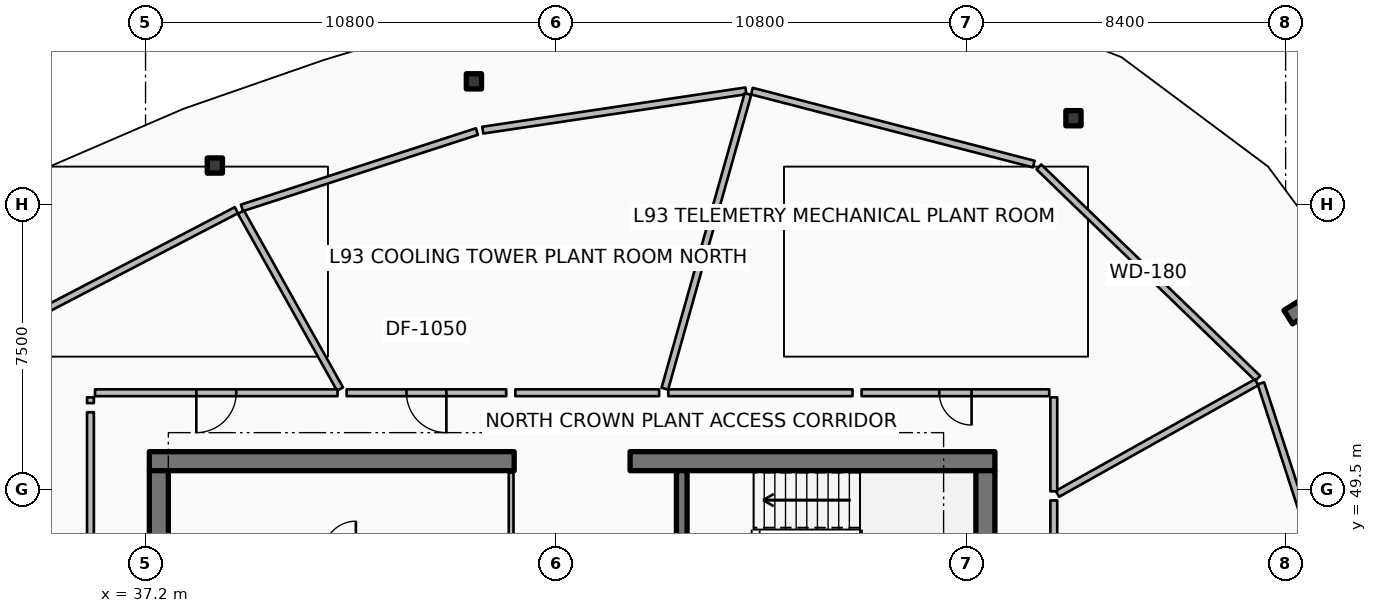
"""IFC4 building model, lengths in metres.
Left out: names, types, materials, properties, quantities, classifications, styles, units other than length and angle.
Written with IfcOpenShell. Run it as: python <this file> out.ifc"""

import sys

from ifc_helpers import new_model, si_unit, direction, frame, frame_2d, origin, origin_2d, place, context, subcontext, project, spatial, rectangle, hollow_rectangle, extrude, element, fill, save


model = new_model("IFC4")
c1 = context("Model", 3, precision=1e-05, world=origin(), true_north=direction((0.0, 1.0)))
c2 = subcontext(c1, "Body", "Model", "MODEL_VIEW")
j1 = project(units=[si_unit("LENGTHUNIT", "METRE"), si_unit("PLANEANGLEUNIT", "RADIAN")], contexts=[c1])
p1 = place(None, origin())
s1 = spatial("IfcSite", under=j1, at=p1, CompositionType="ELEMENT")
p2 = place(p1, origin())
s2 = spatial("IfcBuilding", under=s1, at=p2, CompositionType="ELEMENT")
p3 = place(p2, frame((0.0, 0.0, 370.4)))
s3 = spatial("IfcBuildingStorey", under=s2, at=p3, CompositionType="ELEMENT", Elevation=370.4)
p4 = place(p3, frame((37.3, 50.25, 0.0), z_axis=(0.0, 0.0, 1.0), x_axis=(1.0, 0.0, 0.0)))
e1 = element("IfcWall", 1, at=p4, inside=s3, PredefinedType="SHEAR", context=c2, shape_type="SweptSolid", body=[
    extrude(rectangle(XDim=9.6, YDim=0.5, at=frame_2d((4.8, 0.0))), origin(), (0.0, 0.0, 1.0), 3.6),
])
p5 = place(p3, frame((49.95, 50.25, 0.0), z_axis=(0.0, 0.0, 1.0), x_axis=(1.0, 0.0, 0.0)))
e2 = element("IfcWall", 2, at=p5, inside=s3, PredefinedType="SHEAR", context=c2, shape_type="SweptSolid", body=[
    extrude(rectangle(XDim=9.6, YDim=0.5, at=frame_2d((4.8, 0.0))), origin(), (0.0, 0.0, 1.0), 3.6),
])
for number, where, z_axis, x_axis in (
    (3, (37.55, 34.0, 0.0), (0.0, 0.0, 1.0), (0.0, 1.0, 0.0)),
    (4, (59.3, 34.0, 0.0), (0.0, 0.0, 1.0), (0.0, 1.0, 0.0)),
):
    element("IfcWall", number, at=place(p3, frame(where, z_axis=z_axis, x_axis=x_axis)), inside=s3, PredefinedType="SHEAR", context=c2, shape_type="SweptSolid", body=[
        extrude(rectangle(XDim=16.0, YDim=0.5, at=frame_2d((8.0, 0.0))), origin(), (0.0, 0.0, 1.0), 3.6),
    ])
p6 = place(p3, frame((51.31, 46.5, 0.0), z_axis=(0.0, 0.0, 1.0), x_axis=(0.0, 1.0, 0.0)))
e5 = element("IfcWall", 5, at=p6, inside=s3, PredefinedType="SHEAR", context=c2, shape_type="SweptSolid", body=[
    extrude(rectangle(XDim=3.5, YDim=0.28, at=frame_2d((1.75, 0.0))), origin(), (0.0, 0.0, 1.0), 3.6),
])
p7 = place(p3, frame((67.269, 54.041, 0.0), z_axis=(0.0, 0.0, 1.0), x_axis=(0.848033572426, 0.529942506352, 0.0)))
e6 = element("IfcWall", 6, at=p7, inside=s3, PredefinedType="SOLIDWALL", context=c2, shape_type="SweptSolid", body=[
    extrude(rectangle(XDim=3.5, YDim=0.42, at=frame_2d((1.75, 0.0))), origin(), (0.0, 0.0, 1.0), 3.6),
])
for number, where, z_axis, x_axis in (
    (7, (61.617, 59.274, 0.0), (0.0, 0.0, 1.0), (1.0, 0.0, 0.0)),
    (8, (45.841, 60.244, 0.0), (0.0, 0.0, 1.0), (1.0, 0.0, 0.0)),
    (9, (39.023, 58.029, 0.0), (0.0, 0.0, 1.0), (1.0, 0.0, 0.0)),
):
    element("IfcColumn", number, at=place(p3, frame(where, z_axis=z_axis, x_axis=x_axis)), inside=s3, PredefinedType="COLUMN", context=c2, shape_type="SweptSolid", body=[
        extrude(hollow_rectangle(XDim=0.4, YDim=0.4, WallThickness=0.02, InnerFilletRadius=0.02, OuterFilletRadius=0.04, at=origin_2d()), origin(), (0.0, 0.0, 1.0), 3.32),
    ])
p8 = place(p3, frame((46.82, 47.92, 0.0), z_axis=(0.0, 0.0, 1.0), x_axis=(0.0, 1.0, 0.0)))
e10 = element("IfcWall", 10, at=p8, inside=s3, PredefinedType="PARTITIONING", context=c2, shape_type="SweptSolid", body=[
    extrude(rectangle(XDim=2.03, YDim=0.125, at=frame_2d((1.015, 0.0))), origin(), (0.0, 0.0, 1.0), 2.76),
])
p9 = place(p3, frame((66.467, 52.43, 0.0), z_axis=(0.0, 0.0, 1.0), x_axis=(-0.719364153135, 0.694633151516, 0.0)))
e11 = element("IfcWall", 11, at=p9, inside=s3, PredefinedType="PARTITIONING", context=c2, shape_type="SweptSolid", body=[
    extrude(rectangle(XDim=8.006, YDim=0.18, at=frame_2d((4.003, 0.0))), origin(), (0.0, 0.0, 1.0), 2.76),
])
p10 = place(p3, frame((60.573, 58.066, 0.0), z_axis=(0.0, 0.0, 1.0), x_axis=(-0.968117205342, 0.250497658115, 0.0)))
e12 = element("IfcWall", 12, at=p10, inside=s3, PredefinedType="PARTITIONING", context=c2, shape_type="SweptSolid", body=[
    extrude(rectangle(XDim=7.662, YDim=0.18, at=frame_2d((3.831, 0.0))), origin(), (0.0, 0.0, 1.0), 2.76),
])
p11 = place(p3, frame((52.999, 59.994, 0.0), z_axis=(0.0, 0.0, 1.0), x_axis=(-0.989034336252, -0.147685753256, 0.0)))
e13 = element("IfcWall", 13, at=p11, inside=s3, PredefinedType="PARTITIONING", context=c2, shape_type="SweptSolid", body=[
    extrude(rectangle(XDim=7.003, YDim=0.18, at=frame_2d((3.501, 0.0))), origin(), (0.0, 0.0, 1.0), 2.76),
])
p12 = place(p3, frame((45.918, 58.923, 0.0), z_axis=(0.0, 0.0, 1.0), x_axis=(-0.95105283999, -0.309028308649, 0.0)))
e14 = element("IfcWall", 14, at=p12, inside=s3, PredefinedType="PARTITIONING", context=c2, shape_type="SweptSolid", body=[
    extrude(rectangle(XDim=6.499, YDim=0.18, at=frame_2d((3.25, 0.0))), origin(), (0.0, 0.0, 1.0), 2.76),
])
p13 = place(p3, frame((39.59, 56.853, 0.0), z_axis=(0.0, 0.0, 1.0), x_axis=(-0.886949494865, -0.461866423935, 0.0)))
e15 = element("IfcWall", 15, at=p13, inside=s3, PredefinedType="PARTITIONING", context=c2, shape_type="SweptSolid", body=[
    extrude(rectangle(XDim=7.002, YDim=0.18, at=frame_2d((3.501, 0.0))), origin(), (0.0, 0.0, 1.0), 2.76),
])
p14 = place(p3, frame((69.059, 44.572, 0.0), z_axis=(0.0, 0.0, 1.0), x_axis=(-0.309024234991, 0.951054163646, 0.0)))
e16 = element("IfcWall", 16, at=p14, inside=s3, PredefinedType="PARTITIONING", context=c2, shape_type="SweptSolid", body=[
    extrude(rectangle(XDim=8.124, YDim=0.18, at=frame_2d((4.062, 0.0))), origin(), (0.0, 0.0, 1.0), 2.76),
])
p15 = place(p3, frame((50.714, 52.05, 0.0), z_axis=(0.0, 0.0, 1.0), x_axis=(-1.0, 0.0, 0.0)))
e17 = element("IfcWall", 17, at=p15, inside=s3, PredefinedType="PARTITIONING", context=c2, shape_type="SweptSolid", body=[
    extrude(rectangle(XDim=3.784, YDim=0.18, at=frame_2d((1.892, 0.0))), origin(), (0.0, 0.0, 1.0), 2.76),
])
p16 = place(p3, frame((46.69, 52.05, 0.0), z_axis=(0.0, 0.0, 1.0), x_axis=(-1.0, 0.0, 0.0)))
e18 = element("IfcWall", 18, at=p16, inside=s3, PredefinedType="PARTITIONING", context=c2, shape_type="SweptSolid", body=[
    extrude(rectangle(XDim=4.199, YDim=0.18, at=frame_2d((2.099, 0.0))), origin(), (0.0, 0.0, 1.0), 2.76),
])
p17 = place(p16, frame((1.574, 0.0, 0.0)))
e19 = element("IfcOpeningElement", 19, at=p17, cuts=e18, PredefinedType="OPENING", context=c2, shape_type="SweptSolid", body=[
    extrude(rectangle(XDim=1.05, YDim=2.1, at=frame_2d((0.525, 1.05))), frame((0.0, 0.1, 0.0), z_axis=(0.0, -1.0, 0.0), x_axis=(1.0, 0.0, 0.0)), (0.0, 0.0, 1.0), 0.2),
])
p18 = place(p3, frame((50.864, 52.156, 0.0), z_axis=(0.0, 0.0, 1.0), x_axis=(0.271457285698, 0.962450488099, 0.0)))
e20 = element("IfcWall", 20, at=p18, inside=s3, PredefinedType="PARTITIONING", context=c2, shape_type="SweptSolid", body=[
    extrude(rectangle(XDim=8.056, YDim=0.18, at=frame_2d((4.028, 0.0))), origin(), (0.0, 0.0, 1.0), 2.76),
])
p19 = place(p3, frame((42.318, 52.146, 0.0), z_axis=(0.0, 0.0, 1.0), x_axis=(-0.488622869326, 0.872495095443, 0.0)))
e21 = element("IfcWall", 21, at=p19, inside=s3, PredefinedType="PARTITIONING", context=c2, shape_type="SweptSolid", body=[
    extrude(rectangle(XDim=5.337, YDim=0.18, at=frame_2d((2.668, 0.0))), origin(), (0.0, 0.0, 1.0), 2.76),
])
p20 = place(p3, frame((42.252, 52.05, 0.0), z_axis=(0.0, 0.0, 1.0), x_axis=(-1.0, 0.0, 0.0)))
e22 = element("IfcWall", 22, at=p20, inside=s3, PredefinedType="PARTITIONING", context=c2, shape_type="SweptSolid", body=[
    extrude(rectangle(XDim=6.382, YDim=0.18, at=frame_2d((3.191, 0.0))), origin(), (0.0, 0.0, 1.0), 2.76),
])
p21 = place(p20, frame((2.666, 0.0, 0.0)))
e23 = element("IfcOpeningElement", 23, at=p21, cuts=e22, PredefinedType="OPENING", context=c2, shape_type="SweptSolid", body=[
    extrude(rectangle(XDim=1.05, YDim=2.1, at=frame_2d((0.525, 1.05))), frame((0.0, 0.1, 0.0), z_axis=(0.0, -1.0, 0.0), x_axis=(1.0, 0.0, 0.0)), (0.0, 0.0, 1.0), 0.2),
])
p22 = place(p3, frame((35.75, 51.93, 0.0), z_axis=(0.0, 0.0, 1.0), x_axis=(0.0, -1.0, 0.0)))
e24 = element("IfcWall", 24, at=p22, inside=s3, PredefinedType="PARTITIONING", context=c2, shape_type="SweptSolid", body=[
    extrude(rectangle(XDim=0.153, YDim=0.18, at=frame_2d((0.076, 0.0))), origin(), (0.0, 0.0, 1.0), 2.76),
])
p23 = place(p3, frame((35.75, 51.537, 0.0), z_axis=(0.0, 0.0, 1.0), x_axis=(0.0, -1.0, 0.0)))
e25 = element("IfcWall", 25, at=p23, inside=s3, PredefinedType="PARTITIONING", context=c2, shape_type="SweptSolid", body=[
    extrude(rectangle(XDim=5.962, YDim=0.18, at=frame_2d((2.981, 0.0))), origin(), (0.0, 0.0, 1.0), 2.76),
])
p24 = place(p3, frame((61.1, 43.67, 0.0), z_axis=(0.0, 0.0, 1.0), x_axis=(0.0, 1.0, 0.0)))
e26 = element("IfcWall", 26, at=p24, inside=s3, PredefinedType="PARTITIONING", context=c2, shape_type="SweptSolid", body=[
    extrude(rectangle(XDim=5.546, YDim=0.18, at=frame_2d((2.773, 0.0))), origin(), (0.0, 0.0, 1.0), 2.76),
])
p25 = place(p24, frame((2.348, 0.0, 0.0)))
e27 = element("IfcOpeningElement", 27, at=p25, cuts=e26, PredefinedType="OPENING", context=c2, shape_type="SweptSolid", body=[
    extrude(rectangle(XDim=0.85, YDim=2.06, at=frame_2d((0.425, 1.03))), frame((0.0, 0.1, 0.0), z_axis=(0.0, -1.0, 0.0), x_axis=(1.0, 0.0, 0.0)), (0.0, 0.0, 1.0), 0.2),
])
p26 = place(p3, frame((61.196, 49.39, 0.0), z_axis=(0.0, 0.0, 1.0), x_axis=(0.87249769897, 0.488618220385, 0.0)))
e28 = element("IfcWall", 28, at=p26, inside=s3, PredefinedType="PARTITIONING", context=c2, shape_type="SweptSolid", body=[
    extrude(rectangle(XDim=6.007, YDim=0.18, at=frame_2d((3.003, 0.0))), origin(), (0.0, 0.0, 1.0), 2.76),
])
p27 = place(p3, frame((61.1, 49.456, 0.0), z_axis=(0.0, 0.0, 1.0), x_axis=(0.0, 1.0, 0.0)))
e29 = element("IfcWall", 29, at=p27, inside=s3, PredefinedType="PARTITIONING", context=c2, shape_type="SweptSolid", body=[
    extrude(rectangle(XDim=2.474, YDim=0.18, at=frame_2d((1.237, 0.0))), origin(), (0.0, 0.0, 1.0), 2.76),
])
p28 = place(p3, frame((60.98, 52.05, 0.0), z_axis=(0.0, 0.0, 1.0), x_axis=(-1.0, 0.0, 0.0)))
e30 = element("IfcWall", 30, at=p28, inside=s3, PredefinedType="PARTITIONING", context=c2, shape_type="SweptSolid", body=[
    extrude(rectangle(XDim=4.937, YDim=0.18, at=frame_2d((2.469, 0.0))), origin(), (0.0, 0.0, 1.0), 2.76),
])
p29 = place(p28, frame((2.044, 0.0, 0.0)))
e31 = element("IfcOpeningElement", 31, at=p29, cuts=e30, PredefinedType="OPENING", context=c2, shape_type="SweptSolid", body=[
    extrude(rectangle(XDim=0.85, YDim=2.06, at=frame_2d((0.425, 1.03))), frame((0.0, 0.1, 0.0), z_axis=(0.0, -1.0, 0.0), x_axis=(1.0, 0.0, 0.0)), (0.0, 0.0, 1.0), 0.2),
])
p30 = place(p3, frame((55.803, 52.05, 0.0), z_axis=(0.0, 0.0, 1.0), x_axis=(-1.0, 0.0, 0.0)))
e32 = element("IfcWall", 32, at=p30, inside=s3, PredefinedType="PARTITIONING", context=c2, shape_type="SweptSolid", body=[
    extrude(rectangle(XDim=4.848, YDim=0.18, at=frame_2d((2.424, 0.0))), origin(), (0.0, 0.0, 1.0), 2.76),
])
p31 = place(p17, origin())
e33 = element("IfcDoor", 33, at=p31, inside=s3, OperationType="SINGLE_SWING_LEFT", PredefinedType="DOOR", context=c2, shape_type="SweptSolid", body=[
    extrude(rectangle(XDim=1.05, YDim=2.1, at=frame_2d((0.525, 1.05))), frame((0.0, 0.025, 0.0), z_axis=(0.0, -1.0, 0.0), x_axis=(1.0, 0.0, 0.0)), (0.0, 0.0, 1.0), 0.05),
])
fill(e19, e33)
p32 = place(p21, origin())
e34 = element("IfcDoor", 34, at=p32, inside=s3, OperationType="SINGLE_SWING_RIGHT", PredefinedType="DOOR", context=c2, shape_type="SweptSolid", body=[
    extrude(rectangle(XDim=1.05, YDim=2.1, at=frame_2d((0.525, 1.05))), frame((0.0, 0.025, 0.0), z_axis=(0.0, -1.0, 0.0), x_axis=(1.0, 0.0, 0.0)), (0.0, 0.0, 1.0), 0.05),
])
fill(e23, e34)
p33 = place(p29, origin())
e35 = element("IfcDoor", 35, at=p33, inside=s3, OperationType="SINGLE_SWING_LEFT", PredefinedType="DOOR", context=c2, shape_type="SweptSolid", body=[
    extrude(rectangle(XDim=0.85, YDim=2.06, at=frame_2d((0.425, 1.03))), frame((0.0, 0.025, 0.0), z_axis=(0.0, -1.0, 0.0), x_axis=(1.0, 0.0, 0.0)), (0.0, 0.0, 1.0), 0.05),
])
fill(e31, e35)
save(model, sys.argv[1])
